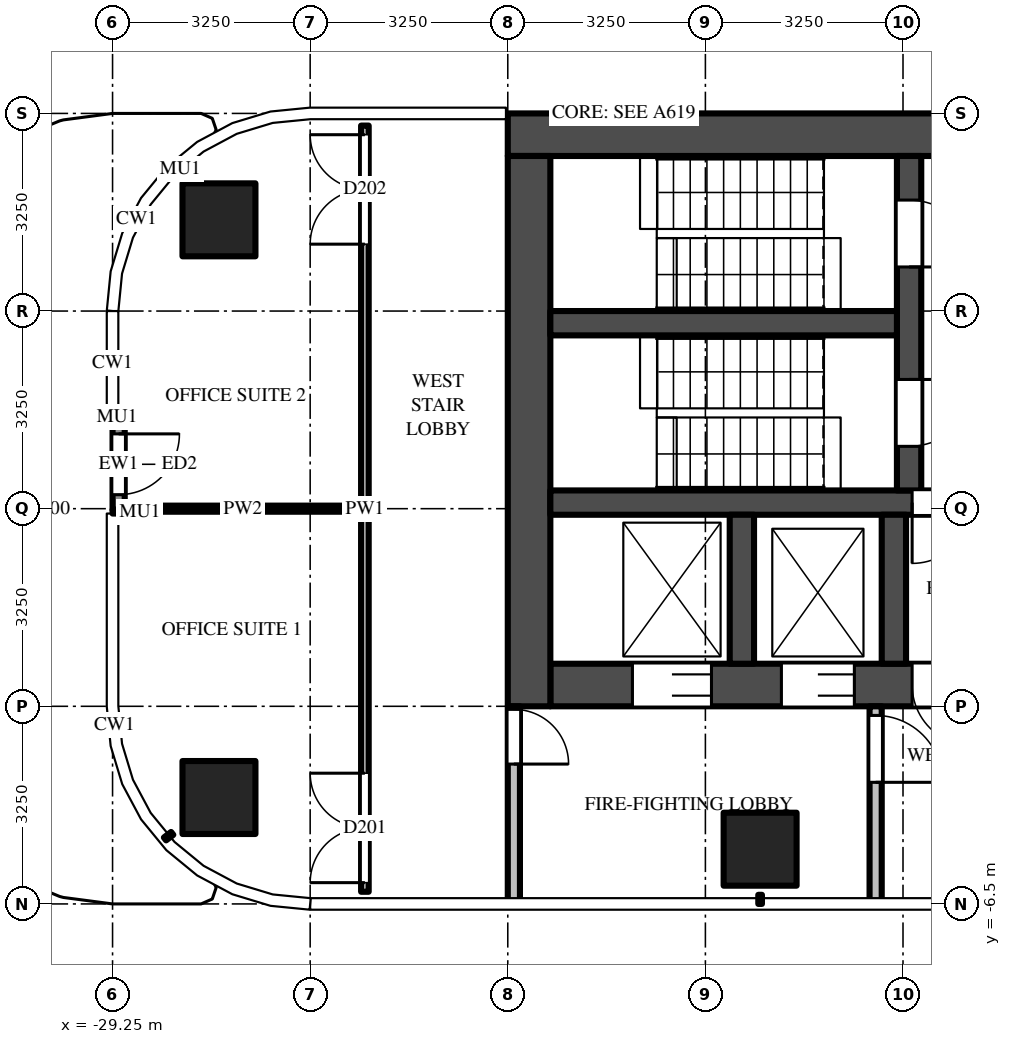
"""IFC4 building model, lengths in metres.
Left out: names, types, materials, properties, quantities, classifications, styles, units other than length and angle.
Written with IfcOpenShell. Run it as: python <this file> out.ifc"""

import sys

from ifc_helpers import new_model, si_unit, direction, frame, frame_2d, origin, origin_2d, place, context, subcontext, project, spatial, rectangle, extrude, source, transform, mapped, element, fill, save


model = new_model("IFC4")
c1 = context("Model", 3, precision=1e-05, world=origin(), true_north=direction((0.0, 1.0)))
c2 = subcontext(c1, "Body", "Model", "MODEL_VIEW")
j1 = project(units=[si_unit("LENGTHUNIT", "METRE"), si_unit("PLANEANGLEUNIT", "RADIAN")], contexts=[c1])
p1 = place(None, origin())
s1 = spatial("IfcSite", under=j1, at=p1, CompositionType="ELEMENT")
p2 = place(p1, origin())
s2 = spatial("IfcBuilding", under=s1, at=p2, CompositionType="ELEMENT")
p3 = place(p2, frame((0.0, 0.0, 162.0)))
s3 = spatial("IfcBuildingStorey", under=s2, at=p3, CompositionType="ELEMENT", Elevation=162.0)
m1 = source(origin(), c2, "Body", "SweptSolid", [
    extrude(rectangle(XDim=1.2, YDim=1.2, at=origin_2d()), origin(), (0.0, 0.0, 1.0), 3.9),
])
for number, where, z_axis, x_axis in (
    (1, (-18.6, -5.6, 0.0), (0.0, 0.0, 1.0), (1.0, 0.0, 0.0)),
    (2, (-27.5, -4.75, 0.0), (0.0, 0.0, 1.0), (1.0, 0.0, 0.0)),
    (3, (-27.5, 4.75, 0.0), (0.0, 0.0, 1.0), (1.0, 0.0, 0.0)),
):
    element("IfcColumn", number, at=place(p3, frame(where, z_axis=z_axis, x_axis=x_axis)), inside=s3, PredefinedType="COLUMN", context=c2, shape_type="MappedRepresentation", body=[
        mapped(m1, transform((0.0, 0.0, 0.0))),
    ])
m2 = source(origin(), c2, "Body", "SweptSolid", [
    extrude(rectangle(XDim=16.55, YDim=0.7, at=frame_2d((8.275, 0.0))), origin(), (0.0, 0.0, 1.0), 3.7),
])
p4 = place(p3, frame((-6.2, 6.15, 0.0), z_axis=(0.0, 0.0, 1.0), x_axis=(-1.0, 0.0, 0.0)))
e4 = element("IfcWall", 4, at=p4, inside=s3, PredefinedType="SHEAR", context=c2, shape_type="MappedRepresentation", body=[
    mapped(m2, transform((0.0, 0.0, 0.0))),
])
m3 = source(origin(), c2, "Body", "SweptSolid", [
    extrude(rectangle(XDim=14.85, YDim=0.7, at=frame_2d((7.425, 0.0))), origin(), (0.0, 0.0, 1.0), 3.7),
])
p5 = place(p3, frame((-7.2, -2.9, 0.0), z_axis=(0.0, 0.0, 1.0), x_axis=(-1.0, 0.0, 0.0)))
e5 = element("IfcWall", 5, at=p5, inside=s3, PredefinedType="SHEAR", context=c2, shape_type="MappedRepresentation", body=[
    mapped(m3, transform((0.0, 0.0, 0.0))),
])
m4 = source(origin(), c2, "Body", "SweptSolid", [
    extrude(rectangle(XDim=1.1, YDim=2.1, at=frame_2d((0.55, 1.05))), frame((0.0, 0.36, 0.0), z_axis=(0.0, -1.0, 0.0), x_axis=(1.0, 0.0, 0.0)), (0.0, 0.0, 1.0), 0.72),
])
p6 = place(p5, frame((0.55, 0.0, 0.0)))
e6 = element("IfcOpeningElement", 6, at=p6, cuts=e5, PredefinedType="OPENING", context=c2, shape_type="MappedRepresentation", body=[
    mapped(m4, transform((0.0, 0.0, 0.0))),
])
p7 = place(p5, frame((3.15, 0.0, 0.0)))
e7 = element("IfcOpeningElement", 7, at=p7, cuts=e5, PredefinedType="OPENING", context=c2, shape_type="MappedRepresentation", body=[
    mapped(m4, transform((0.0, 0.0, 0.0))),
])
m5 = source(origin(), c2, "Body", "SweptSolid", [
    extrude(rectangle(XDim=1.2, YDim=2.1, at=frame_2d((0.6, 1.05))), frame((0.0, 0.36, 0.0), z_axis=(0.0, -1.0, 0.0), x_axis=(1.0, 0.0, 0.0)), (0.0, 0.0, 1.0), 0.72),
])
p8 = place(p5, frame((5.7, 0.0, 0.0)))
e8 = element("IfcOpeningElement", 8, at=p8, cuts=e5, PredefinedType="OPENING", context=c2, shape_type="MappedRepresentation", body=[
    mapped(m5, transform((0.0, 0.0, 0.0))),
])
m6 = source(origin(), c2, "Body", "SweptSolid", [
    extrude(rectangle(XDim=1.3, YDim=2.1, at=frame_2d((0.65, 1.05))), frame((0.0, 0.36, 0.0), z_axis=(0.0, -1.0, 0.0), x_axis=(1.0, 0.0, 0.0)), (0.0, 0.0, 1.0), 0.72),
])
p9 = place(p5, frame((12.2, 0.0, 0.0)))
e9 = element("IfcOpeningElement", 9, at=p9, cuts=e5, PredefinedType="OPENING", context=c2, shape_type="MappedRepresentation", body=[
    mapped(m6, transform((0.0, 0.0, 0.0))),
])
p10 = place(p5, frame((9.85, 0.0, 0.0)))
e10 = element("IfcOpeningElement", 10, at=p10, cuts=e5, PredefinedType="OPENING", context=c2, shape_type="MappedRepresentation", body=[
    mapped(m5, transform((0.0, 0.0, 0.0))),
])
m7 = source(origin(), c2, "Body", "SweptSolid", [
    extrude(rectangle(XDim=1.0, YDim=2.1, at=frame_2d((0.5, 1.05))), frame((0.0, 0.36, 0.0), z_axis=(0.0, -1.0, 0.0), x_axis=(1.0, 0.0, 0.0)), (0.0, 0.0, 1.0), 0.72),
])
p11 = place(p5, frame((7.9, 0.0, 0.0)))
e11 = element("IfcOpeningElement", 11, at=p11, cuts=e5, PredefinedType="OPENING", context=c2, shape_type="MappedRepresentation", body=[
    mapped(m7, transform((0.0, 0.0, 0.0))),
])
m8 = source(origin(), c2, "Body", "SweptSolid", [
    extrude(rectangle(XDim=9.05, YDim=0.7, at=frame_2d((4.525, 0.0))), origin(), (0.0, 0.0, 1.0), 3.7),
])
p12 = place(p3, frame((-22.4, 5.8, 0.0), z_axis=(0.0, 0.0, 1.0), x_axis=(0.0, -1.0, 0.0)))
e12 = element("IfcWall", 12, at=p12, inside=s3, PredefinedType="SHEAR", context=c2, shape_type="MappedRepresentation", body=[
    mapped(m8, transform((0.0, 0.0, 0.0))),
])
m9 = source(origin(), c2, "Body", "SweptSolid", [
    extrude(rectangle(XDim=14.85, YDim=0.4, at=frame_2d((7.425, 0.0))), origin(), (0.0, 0.0, 1.0), 3.7),
])
p13 = place(p3, frame((-7.2, 0.1, 0.0), z_axis=(0.0, 0.0, 1.0), x_axis=(-1.0, 0.0, 0.0)))
e13 = element("IfcWall", 13, at=p13, inside=s3, PredefinedType="SHEAR", context=c2, shape_type="MappedRepresentation", body=[
    mapped(m9, transform((0.0, 0.0, 0.0))),
])
m10 = source(origin(), c2, "Body", "SweptSolid", [
    extrude(rectangle(XDim=1.0, YDim=2.1, at=frame_2d((0.5, 1.05))), frame((0.0, 0.21, 0.0), z_axis=(0.0, -1.0, 0.0), x_axis=(1.0, 0.0, 0.0)), (0.0, 0.0, 1.0), 0.42),
])
p14 = place(p13, frame((7.9, 0.0, 0.0)))
e14 = element("IfcOpeningElement", 14, at=p14, cuts=e13, PredefinedType="OPENING", context=c2, shape_type="MappedRepresentation", body=[
    mapped(m10, transform((0.0, 0.0, 0.0))),
])
m11 = source(origin(), c2, "Body", "SweptSolid", [
    extrude(rectangle(XDim=5.5, YDim=0.4, at=frame_2d((2.75, 0.0))), origin(), (0.0, 0.0, 1.0), 3.7),
])
p15 = place(p3, frame((-16.15, 5.8, 0.0), z_axis=(0.0, 0.0, 1.0), x_axis=(0.0, -1.0, 0.0)))
e15 = element("IfcWall", 15, at=p15, inside=s3, PredefinedType="SHEAR", context=c2, shape_type="MappedRepresentation", body=[
    mapped(m11, transform((0.0, 0.0, 0.0))),
])
m12 = source(origin(), c2, "Body", "SweptSolid", [
    extrude(rectangle(XDim=1.1, YDim=2.1, at=frame_2d((0.55, 1.05))), frame((0.0, 0.21, 0.0), z_axis=(0.0, -1.0, 0.0), x_axis=(1.0, 0.0, 0.0)), (0.0, 0.0, 1.0), 0.42),
])
p16 = place(p15, frame((0.725, 0.0, 0.0)))
e16 = element("IfcOpeningElement", 16, at=p16, cuts=e15, PredefinedType="OPENING", context=c2, shape_type="MappedRepresentation", body=[
    mapped(m12, transform((0.0, 0.0, 0.0))),
])
p17 = place(p15, frame((3.675, 0.0, 0.0)))
e17 = element("IfcOpeningElement", 17, at=p17, cuts=e15, PredefinedType="OPENING", context=c2, shape_type="MappedRepresentation", body=[
    mapped(m12, transform((0.0, 0.0, 0.0))),
])
m13 = source(origin(), c2, "Body", "SweptSolid", [
    extrude(rectangle(XDim=5.7, YDim=0.4, at=frame_2d((2.85, 0.0))), origin(), (0.0, 0.0, 1.0), 3.7),
])
p18 = place(p3, frame((-16.35, 3.05, 0.0), z_axis=(0.0, 0.0, 1.0), x_axis=(-1.0, 0.0, 0.0)))
e18 = element("IfcWall", 18, at=p18, inside=s3, PredefinedType="SHEAR", context=c2, shape_type="MappedRepresentation", body=[
    mapped(m13, transform((0.0, 0.0, 0.0))),
])
m14 = source(origin(), c2, "Body", "SweptSolid", [
    extrude(rectangle(XDim=2.45, YDim=0.4, at=frame_2d((1.225, 0.0))), origin(), (0.0, 0.0, 1.0), 3.7),
])
for number, where, z_axis, x_axis in (
    (19, (-16.4, -0.1, 0.0), (0.0, 0.0, 1.0), (0.0, -1.0, 0.0)),
    (20, (-18.9, -0.1, 0.0), (0.0, 0.0, 1.0), (0.0, -1.0, 0.0)),
):
    element("IfcWall", number, at=place(p3, frame(where, z_axis=z_axis, x_axis=x_axis)), inside=s3, PredefinedType="SHEAR", context=c2, shape_type="MappedRepresentation", body=[
        mapped(m14, transform((0.0, 0.0, 0.0))),
    ])
m15 = source(origin(), c2, "Body", "SweptSolid", [
    extrude(rectangle(XDim=3.25, YDim=0.2, at=frame_2d((1.625, 0.0))), origin(), (0.0, 0.0, 1.0), 3.7),
])
p19 = place(p3, frame((-16.7, -3.25, 0.0), z_axis=(0.0, 0.0, 1.0), x_axis=(0.0, -1.0, 0.0)))
e21 = element("IfcWall", 21, at=p19, inside=s3, PredefinedType="PARTITIONING", context=c2, shape_type="MappedRepresentation", body=[
    mapped(m15, transform((0.0, 0.0, 0.0))),
])
m16 = source(origin(), c2, "Body", "SweptSolid", [
    extrude(rectangle(XDim=1.1, YDim=2.1, at=frame_2d((0.55, 1.05))), frame((0.0, 0.11, 0.0), z_axis=(0.0, -1.0, 0.0), x_axis=(1.0, 0.0, 0.0)), (0.0, 0.0, 1.0), 0.22),
])
p20 = place(p19, frame((0.15, 0.0, 0.0)))
e22 = element("IfcOpeningElement", 22, at=p20, cuts=e21, PredefinedType="OPENING", context=c2, shape_type="MappedRepresentation", body=[
    mapped(m16, transform((0.0, 0.0, 0.0))),
])
p21 = place(p3, frame((-22.65, -3.25, 0.0), z_axis=(0.0, 0.0, 1.0), x_axis=(0.0, -1.0, 0.0)))
e23 = element("IfcWall", 23, at=p21, inside=s3, PredefinedType="PARTITIONING", context=c2, shape_type="MappedRepresentation", body=[
    mapped(m15, transform((0.0, 0.0, 0.0))),
])
m17 = source(origin(), c2, "Body", "SweptSolid", [
    extrude(rectangle(XDim=0.9, YDim=2.1, at=frame_2d((0.45, 1.05))), frame((0.0, 0.11, 0.0), z_axis=(0.0, -1.0, 0.0), x_axis=(1.0, 0.0, 0.0)), (0.0, 0.0, 1.0), 0.22),
])
p22 = place(p21, frame((0.05, 0.0, 0.0)))
e24 = element("IfcOpeningElement", 24, at=p22, cuts=e23, PredefinedType="OPENING", context=c2, shape_type="MappedRepresentation", body=[
    mapped(m17, transform((0.0, 0.0, 0.0))),
])
m18 = source(origin(), c2, "Body", "SweptSolid", [
    extrude(rectangle(XDim=1.5, YDim=0.2, at=frame_2d((0.75, 0.0))), origin(), (0.0, 0.0, 1.0), 3.7),
])
p23 = place(p3, frame((-29.15, 1.48, 0.0), z_axis=(0.0, 0.0, 1.0), x_axis=(0.0, -1.0, 0.0)))
e25 = element("IfcWall", 25, at=p23, inside=s3, PredefinedType="SOLIDWALL", context=c2, shape_type="MappedRepresentation", body=[
    mapped(m18, transform((0.0, 0.0, 0.0))),
])
m19 = source(origin(), c2, "Body", "SweptSolid", [
    extrude(rectangle(XDim=1.0, YDim=2.4, at=frame_2d((0.5, 1.2))), frame((0.0, 0.11, 0.0), z_axis=(0.0, -1.0, 0.0), x_axis=(1.0, 0.0, 0.0)), (0.0, 0.0, 1.0), 0.22),
])
p24 = place(p23, frame((0.25, 0.0, 0.0)))
e26 = element("IfcOpeningElement", 26, at=p24, cuts=e25, PredefinedType="OPENING", context=c2, shape_type="MappedRepresentation", body=[
    mapped(m19, transform((0.0, 0.0, 0.0))),
])
m20 = source(origin(), c2, "Body", "SweptSolid", [
    extrude(rectangle(XDim=12.6, YDim=0.125, at=frame_2d((6.3, 0.0))), origin(), (0.0, 0.0, 1.0), 2.78),
])
p25 = place(p3, frame((-25.1, -6.3, 0.0), z_axis=(0.0, 0.0, 1.0), x_axis=(0.0, 1.0, 0.0)))
e27 = element("IfcWall", 27, at=p25, inside=s3, PredefinedType="PARTITIONING", context=c2, shape_type="MappedRepresentation", body=[
    mapped(m20, transform((0.0, 0.0, 0.0))),
])
m21 = source(origin(), c2, "Body", "SweptSolid", [
    extrude(rectangle(XDim=1.8, YDim=2.1, at=frame_2d((0.9, 1.05))), frame((0.0, 0.073, 0.0), z_axis=(0.0, -1.0, 0.0), x_axis=(1.0, 0.0, 0.0)), (0.0, 0.0, 1.0), 0.145),
])
p26 = place(p25, frame((0.15, 0.0, 0.0)))
e28 = element("IfcOpeningElement", 28, at=p26, cuts=e27, PredefinedType="OPENING", context=c2, shape_type="MappedRepresentation", body=[
    mapped(m21, transform((0.0, 0.0, 0.0))),
])
p27 = place(p25, frame((10.65, 0.0, 0.0)))
e29 = element("IfcOpeningElement", 29, at=p27, cuts=e27, PredefinedType="OPENING", context=c2, shape_type="MappedRepresentation", body=[
    mapped(m21, transform((0.0, 0.0, 0.0))),
])
m22 = source(origin(), c2, "Body", "SweptSolid", [
    extrude(rectangle(XDim=3.887, YDim=0.1, at=frame_2d((1.944, 0.0))), origin(), (0.0, 0.0, 1.0), 2.78),
])
p28 = place(p3, frame((-29.05, 0.0, 0.0), z_axis=(0.0, 0.0, 1.0), x_axis=(1.0, 0.0, 0.0)))
e30 = element("IfcWall", 30, at=p28, inside=s3, PredefinedType="PARTITIONING", context=c2, shape_type="MappedRepresentation", body=[
    mapped(m22, transform((0.0, 0.0, 0.0))),
])
m23 = source(origin(), c2, "Body", "SweptSolid", [
    extrude(rectangle(XDim=1.3, YDim=2.1, at=frame_2d((0.65, 1.05))), frame((0.0, -0.275, 0.0), z_axis=(0.0, -1.0, 0.0), x_axis=(1.0, 0.0, 0.0)), (0.0, 0.0, 1.0), 0.05),
])
p29 = place(p9, origin())
e31 = element("IfcDoor", 31, at=p29, inside=s3, OperationType="DOUBLE_DOOR_SLIDING", PredefinedType="DOOR", context=c2, shape_type="MappedRepresentation", body=[
    mapped(m23, transform((0.0, 0.0, 0.0))),
])
fill(e9, e31)
m24 = source(origin(), c2, "Body", "SweptSolid", [
    extrude(rectangle(XDim=1.2, YDim=2.1, at=frame_2d((0.6, 1.05))), frame((0.0, -0.275, 0.0), z_axis=(0.0, -1.0, 0.0), x_axis=(1.0, 0.0, 0.0)), (0.0, 0.0, 1.0), 0.05),
])
p30 = place(p10, origin())
e32 = element("IfcDoor", 32, at=p30, inside=s3, OperationType="DOUBLE_DOOR_SLIDING", PredefinedType="DOOR", context=c2, shape_type="MappedRepresentation", body=[
    mapped(m24, transform((0.0, 0.0, 0.0))),
])
fill(e10, e32)
m25 = source(origin(), c2, "Body", "SweptSolid", [
    extrude(rectangle(XDim=1.1, YDim=2.1, at=frame_2d((0.55, 1.05))), frame((0.0, 0.025, 0.0), z_axis=(0.0, -1.0, 0.0), x_axis=(1.0, 0.0, 0.0)), (0.0, 0.0, 1.0), 0.05),
])
p31 = place(p16, origin())
e33 = element("IfcDoor", 33, at=p31, inside=s3, OperationType="SINGLE_SWING_RIGHT", PredefinedType="DOOR", context=c2, shape_type="MappedRepresentation", body=[
    mapped(m25, transform((0.0, 0.0, 0.0))),
])
fill(e16, e33)
p32 = place(p17, origin())
e34 = element("IfcDoor", 34, at=p32, inside=s3, OperationType="SINGLE_SWING_LEFT", PredefinedType="DOOR", context=c2, shape_type="MappedRepresentation", body=[
    mapped(m25, transform((0.0, 0.0, 0.0))),
])
fill(e17, e34)
m26 = source(origin(), c2, "Body", "SweptSolid", [
    extrude(rectangle(XDim=1.0, YDim=2.1, at=frame_2d((0.5, 1.05))), frame((0.0, 0.025, 0.0), z_axis=(0.0, -1.0, 0.0), x_axis=(1.0, 0.0, 0.0)), (0.0, 0.0, 1.0), 0.05),
])
p33 = place(p14, origin())
e35 = element("IfcDoor", 35, at=p33, inside=s3, OperationType="SINGLE_SWING_RIGHT", PredefinedType="DOOR", context=c2, shape_type="MappedRepresentation", body=[
    mapped(m26, transform((0.0, 0.0, 0.0))),
])
fill(e14, e35)
m27 = source(origin(), c2, "Body", "SweptSolid", [
    extrude(rectangle(XDim=1.0, YDim=2.1, at=frame_2d((0.5, 1.05))), frame((0.0, -0.275, 0.0), z_axis=(0.0, -1.0, 0.0), x_axis=(1.0, 0.0, 0.0)), (0.0, 0.0, 1.0), 0.05),
])
p34 = place(p11, origin())
e36 = element("IfcDoor", 36, at=p34, inside=s3, OperationType="SINGLE_SWING_LEFT", PredefinedType="DOOR", context=c2, shape_type="MappedRepresentation", body=[
    mapped(m27, transform((0.0, 0.0, 0.0))),
])
fill(e11, e36)
p35 = place(p20, origin())
e37 = element("IfcDoor", 37, at=p35, inside=s3, OperationType="SINGLE_SWING_RIGHT", PredefinedType="DOOR", context=c2, shape_type="MappedRepresentation", body=[
    mapped(m25, transform((0.0, 0.0, 0.0))),
])
fill(e22, e37)
m28 = source(origin(), c2, "Body", "SweptSolid", [
    extrude(rectangle(XDim=0.9, YDim=2.1, at=frame_2d((0.45, 1.05))), frame((0.0, 0.025, 0.0), z_axis=(0.0, -1.0, 0.0), x_axis=(1.0, 0.0, 0.0)), (0.0, 0.0, 1.0), 0.05),
])
p36 = place(p22, origin())
e38 = element("IfcDoor", 38, at=p36, inside=s3, OperationType="SINGLE_SWING_RIGHT", PredefinedType="DOOR", context=c2, shape_type="MappedRepresentation", body=[
    mapped(m28, transform((0.0, 0.0, 0.0))),
])
fill(e24, e38)
m29 = source(origin(), c2, "Body", "SweptSolid", [
    extrude(rectangle(XDim=1.0, YDim=2.4, at=frame_2d((0.5, 1.2))), frame((0.0, 0.025, 0.0), z_axis=(0.0, -1.0, 0.0), x_axis=(1.0, 0.0, 0.0)), (0.0, 0.0, 1.0), 0.05),
])
p37 = place(p24, origin())
e39 = element("IfcDoor", 39, at=p37, inside=s3, OperationType="SINGLE_SWING_LEFT", PredefinedType="DOOR", context=c2, shape_type="MappedRepresentation", body=[
    mapped(m29, transform((0.0, 0.0, 0.0))),
])
fill(e26, e39)
m30 = source(origin(), c2, "Body", "SweptSolid", [
    extrude(rectangle(XDim=1.8, YDim=2.1, at=frame_2d((0.9, 1.05))), frame((0.0, 0.025, 0.0), z_axis=(0.0, -1.0, 0.0), x_axis=(1.0, 0.0, 0.0)), (0.0, 0.0, 1.0), 0.05),
])
p38 = place(p26, origin())
e40 = element("IfcDoor", 40, at=p38, inside=s3, OperationType="DOUBLE_DOOR_SINGLE_SWING", PredefinedType="DOOR", context=c2, shape_type="MappedRepresentation", body=[
    mapped(m30, transform((0.0, 0.0, 0.0))),
])
fill(e28, e40)
p39 = place(p27, origin())
e41 = element("IfcDoor", 41, at=p39, inside=s3, OperationType="DOUBLE_DOOR_SINGLE_SWING", PredefinedType="DOOR", context=c2, shape_type="MappedRepresentation", body=[
    mapped(m30, transform((0.0, 0.0, 0.0))),
])
fill(e29, e41)
save(model, sys.argv[1])
